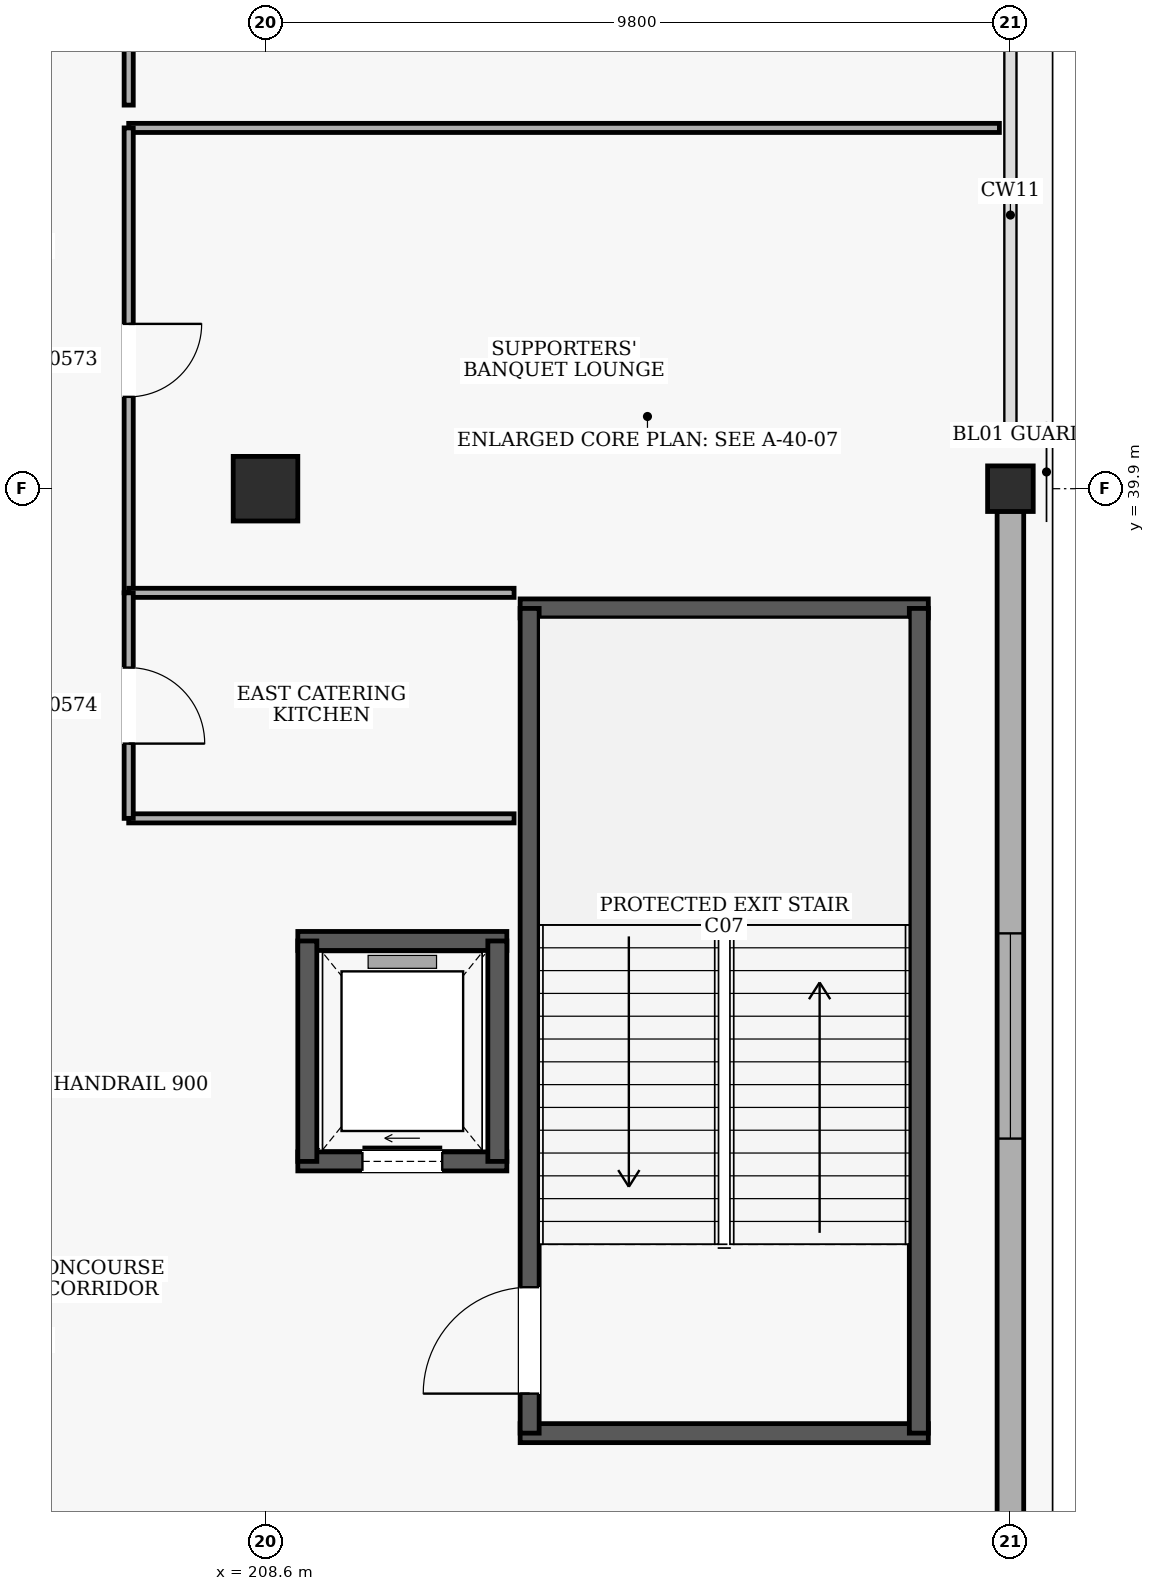
"""IFC4 building model, lengths in metres.
Left out: names, types, materials, properties, quantities, classifications, styles, units other than length and angle.
Written with IfcOpenShell. Run it as: python <this file> out.ifc"""

import sys

from ifc_helpers import new_model, si_unit, direction, frame, frame_2d, origin, origin_2d, place, context, subcontext, project, spatial, rectangle, extrude, element, fill, save


model = new_model("IFC4")
c1 = context("Model", 3, precision=1e-05, world=origin(), true_north=direction((0.0, 1.0)))
c2 = subcontext(c1, "Body", "Model", "MODEL_VIEW")
j1 = project(units=[si_unit("LENGTHUNIT", "METRE"), si_unit("PLANEANGLEUNIT", "RADIAN")], contexts=[c1])
p1 = place(None, origin())
s1 = spatial("IfcSite", under=j1, at=p1, CompositionType="ELEMENT")
p2 = place(p1, origin())
s2 = spatial("IfcBuilding", under=s1, at=p2, CompositionType="ELEMENT")
p3 = place(p2, frame((0.0, 0.0, 10.2)))
s3 = spatial("IfcBuildingStorey", under=s2, at=p3, CompositionType="ELEMENT", Elevation=10.2)
p4 = place(p3, frame((208.6, 39.9, 0.0), z_axis=(0.0, 0.0, 1.0), x_axis=(1.0, 0.0, 0.0)))
e1 = element("IfcColumn", 1, at=p4, inside=s3, PredefinedType="COLUMN", context=c2, shape_type="SweptSolid", body=[
    extrude(rectangle(XDim=0.85, YDim=0.85, at=origin_2d()), origin(), (0.0, 0.0, 1.0), 4.8),
])
p5 = place(p3, frame((218.4, 39.9, 0.0), z_axis=(0.0, 0.0, 1.0), x_axis=(1.0, 0.0, 0.0)))
e2 = element("IfcColumn", 2, at=p5, inside=s3, PredefinedType="COLUMN", context=c2, shape_type="SweptSolid", body=[
    extrude(rectangle(XDim=0.6, YDim=0.6, at=origin_2d()), origin(), (0.0, 0.0, 1.0), 4.8),
])
p6 = place(p3, frame((218.4, 39.605, 0.0), z_axis=(0.0, 0.0, 1.0), x_axis=(0.0, -1.0, 0.0)))
e3 = element("IfcWall", 3, at=p6, inside=s3, PredefinedType="SOLIDWALL", context=c2, shape_type="SweptSolid", body=[
    extrude(rectangle(XDim=13.81, YDim=0.35, at=frame_2d((6.905, 0.0))), origin(), (0.0, 0.0, 1.0), 3.56),
])
p7 = place(p6, frame((5.555, 0.0, 0.9)))
e4 = element("IfcOpeningElement", 4, at=p7, cuts=e3, PredefinedType="OPENING", context=c2, shape_type="SweptSolid", body=[
    extrude(rectangle(XDim=2.7, YDim=1.8, at=frame_2d((1.35, 0.9))), frame((0.0, 0.185, 0.0), z_axis=(0.0, -1.0, 0.0), x_axis=(1.0, 0.0, 0.0)), (0.0, 0.0, 1.0), 0.37),
])
for number, where, z_axis, x_axis in (
    (5, (211.95, 27.475, 0.0), (0.0, 0.0, 1.0), (1.0, 0.0, 0.0)),
    (6, (217.32, 38.325, 0.0), (0.0, 0.0, 1.0), (-1.0, 0.0, 0.0)),
):
    element("IfcWall", number, at=place(p3, frame(where, z_axis=z_axis, x_axis=x_axis)), inside=s3, PredefinedType="SHEAR", context=c2, shape_type="SweptSolid", body=[
        extrude(rectangle(XDim=5.37, YDim=0.25, at=frame_2d((2.685, 0.0))), origin(), (0.0, 0.0, 1.0), 4.48),
    ])
p8 = place(p3, frame((212.075, 27.475, 0.0), z_axis=(0.0, 0.0, 1.0), x_axis=(0.0, 1.0, 0.0)))
e7 = element("IfcWall", 7, at=p8, inside=s3, PredefinedType="SHEAR", context=c2, shape_type="SweptSolid", body=[
    extrude(rectangle(XDim=10.85, YDim=0.25, at=frame_2d((5.425, 0.0))), origin(), (0.0, 0.0, 1.0), 4.48),
])
p9 = place(p8, frame((0.52, 0.0, 0.0)))
e8 = element("IfcOpeningElement", 8, at=p9, cuts=e7, PredefinedType="OPENING", context=c2, shape_type="SweptSolid", body=[
    extrude(rectangle(XDim=1.4, YDim=2.15, at=frame_2d((0.7, 1.075))), frame((0.0, 0.135, 0.0), z_axis=(0.0, -1.0, 0.0), x_axis=(1.0, 0.0, 0.0)), (0.0, 0.0, 1.0), 0.27),
])
p10 = place(p3, frame((217.195, 27.475, 0.0), z_axis=(0.0, 0.0, 1.0), x_axis=(0.0, 1.0, 0.0)))
e9 = element("IfcWall", 9, at=p10, inside=s3, PredefinedType="SHEAR", context=c2, shape_type="SweptSolid", body=[
    extrude(rectangle(XDim=10.85, YDim=0.25, at=frame_2d((5.425, 0.0))), origin(), (0.0, 0.0, 1.0), 4.48),
])
p11 = place(p3, frame((209.025, 31.05, 0.0), z_axis=(0.0, 0.0, 1.0), x_axis=(1.0, 0.0, 0.0)))
e10 = element("IfcWall", 10, at=p11, inside=s3, PredefinedType="SHEAR", context=c2, shape_type="SweptSolid", body=[
    extrude(rectangle(XDim=2.75, YDim=0.25, at=frame_2d((1.375, 0.0))), origin(), (0.0, 0.0, 1.0), 4.48),
])
p12 = place(p11, frame((0.85, 0.0, 0.0)))
e11 = element("IfcOpeningElement", 11, at=p12, cuts=e10, PredefinedType="OPENING", context=c2, shape_type="SweptSolid", body=[
    extrude(rectangle(XDim=1.05, YDim=2.15, at=frame_2d((0.525, 1.075))), frame((0.0, 0.135, 0.0), z_axis=(0.0, -1.0, 0.0), x_axis=(1.0, 0.0, 0.0)), (0.0, 0.0, 1.0), 0.27),
])
p13 = place(p3, frame((211.775, 33.95, 0.0), z_axis=(0.0, 0.0, 1.0), x_axis=(-1.0, 0.0, 0.0)))
e12 = element("IfcWall", 12, at=p13, inside=s3, PredefinedType="SHEAR", context=c2, shape_type="SweptSolid", body=[
    extrude(rectangle(XDim=2.75, YDim=0.25, at=frame_2d((1.375, 0.0))), origin(), (0.0, 0.0, 1.0), 4.48),
])
for number, where, z_axis, x_axis in (
    (13, (209.15, 33.95, 0.0), (0.0, 0.0, 1.0), (0.0, -1.0, 0.0)),
    (14, (211.65, 31.05, 0.0), (0.0, 0.0, 1.0), (0.0, 1.0, 0.0)),
):
    element("IfcWall", number, at=place(p3, frame(where, z_axis=z_axis, x_axis=x_axis)), inside=s3, PredefinedType="SHEAR", context=c2, shape_type="SweptSolid", body=[
        extrude(rectangle(XDim=2.9, YDim=0.25, at=frame_2d((1.45, 0.0))), origin(), (0.0, 0.0, 1.0), 4.48),
    ])
p14 = place(p3, frame((218.255, 44.646, 0.0), z_axis=(0.0, 0.0, 1.0), x_axis=(-1.0, 0.0, 0.0)))
e15 = element("IfcWall", 15, at=p14, inside=s3, PredefinedType="PARTITIONING", context=c2, shape_type="SweptSolid", body=[
    extrude(rectangle(XDim=11.455, YDim=0.12, at=frame_2d((5.728, 0.0))), origin(), (0.0, 0.0, 1.0), 4.48),
])
p15 = place(p3, frame((206.8, 44.646, 0.0), z_axis=(0.0, 0.0, 1.0), x_axis=(0.0, -1.0, 0.0)))
e16 = element("IfcWall", 16, at=p15, inside=s3, PredefinedType="PARTITIONING", context=c2, shape_type="SweptSolid", body=[
    extrude(rectangle(XDim=6.116, YDim=0.12, at=frame_2d((3.058, 0.0))), origin(), (0.0, 0.0, 1.0), 4.48),
])
p16 = place(p15, frame((2.578, 0.0, 0.0)))
e17 = element("IfcOpeningElement", 17, at=p16, cuts=e16, PredefinedType="OPENING", context=c2, shape_type="SweptSolid", body=[
    extrude(rectangle(XDim=0.96, YDim=2.1, at=frame_2d((0.48, 1.05))), frame((0.0, 0.07, 0.0), z_axis=(0.0, -1.0, 0.0), x_axis=(1.0, 0.0, 0.0)), (0.0, 0.0, 1.0), 0.14),
])
for number, where, z_axis, x_axis in (
    (18, (206.8, 35.563, 0.0), (0.0, 0.0, 1.0), (1.0, 0.0, 0.0)),
    (19, (211.87, 38.53, 0.0), (0.0, 0.0, 1.0), (-1.0, 0.0, 0.0)),
):
    element("IfcWall", number, at=place(p3, frame(where, z_axis=z_axis, x_axis=x_axis)), inside=s3, PredefinedType="PARTITIONING", context=c2, shape_type="SweptSolid", body=[
        extrude(rectangle(XDim=5.07, YDim=0.12, at=frame_2d((2.535, 0.0))), origin(), (0.0, 0.0, 1.0), 4.48),
    ])
p17 = place(p3, frame((206.8, 38.53, 0.0), z_axis=(0.0, 0.0, 1.0), x_axis=(0.0, -1.0, 0.0)))
e20 = element("IfcWall", 20, at=p17, inside=s3, PredefinedType="PARTITIONING", context=c2, shape_type="SweptSolid", body=[
    extrude(rectangle(XDim=2.967, YDim=0.12, at=frame_2d((1.483, 0.0))), origin(), (0.0, 0.0, 1.0), 4.48),
])
p18 = place(p17, frame((0.984, 0.0, 0.0)))
e21 = element("IfcOpeningElement", 21, at=p18, cuts=e20, PredefinedType="OPENING", context=c2, shape_type="SweptSolid", body=[
    extrude(rectangle(XDim=1.0, YDim=2.1, at=frame_2d((0.5, 1.05))), frame((0.0, 0.07, 0.0), z_axis=(0.0, -1.0, 0.0), x_axis=(1.0, 0.0, 0.0)), (0.0, 0.0, 1.0), 0.14),
])
p19 = place(p3, frame((206.8, 54.03, 0.0), z_axis=(0.0, 0.0, 1.0), x_axis=(0.0, -1.0, 0.0)))
e22 = element("IfcWall", 22, at=p19, inside=s3, PredefinedType="PARTITIONING", context=c2, shape_type="SweptSolid", body=[
    extrude(rectangle(XDim=9.083, YDim=0.12, at=frame_2d((4.542, 0.0))), origin(), (0.0, 0.0, 1.0), 4.48),
])
p20 = place(p19, frame((4.017, 0.0, 0.0)))
e23 = element("IfcOpeningElement", 23, at=p20, cuts=e22, PredefinedType="OPENING", context=c2, shape_type="SweptSolid", body=[
    extrude(rectangle(XDim=1.05, YDim=2.15, at=frame_2d((0.525, 1.075))), frame((0.0, 0.07, 0.0), z_axis=(0.0, -1.0, 0.0), x_axis=(1.0, 0.0, 0.0)), (0.0, 0.0, 1.0), 0.14),
])
p21 = place(p7, origin())
e24 = element("IfcWindow", 24, at=p21, inside=s3, PartitioningType="SINGLE_PANEL", PredefinedType="WINDOW", context=c2, shape_type="SweptSolid", body=[
    extrude(rectangle(XDim=2.7, YDim=1.8, at=frame_2d((1.35, 0.9))), frame((0.0, 0.03, 0.0), z_axis=(0.0, -1.0, 0.0), x_axis=(1.0, 0.0, 0.0)), (0.0, 0.0, 1.0), 0.06),
])
fill(e4, e24)
p22 = place(p9, frame((1.4, 0.0, 0.0), z_axis=(0.0, 0.0, 1.0), x_axis=(-1.0, 0.0, 0.0)))
e25 = element("IfcDoor", 25, at=p22, inside=s3, OperationType="SINGLE_SWING_RIGHT", PredefinedType="DOOR", context=c2, shape_type="SweptSolid", body=[
    extrude(rectangle(XDim=1.4, YDim=2.15, at=frame_2d((0.7, 1.075))), frame((0.0, 0.025, 0.0), z_axis=(0.0, -1.0, 0.0), x_axis=(1.0, 0.0, 0.0)), (0.0, 0.0, 1.0), 0.05),
])
fill(e8, e25)
p23 = place(p12, origin())
e26 = element("IfcDoor", 26, at=p23, inside=s3, OperationType="SLIDING_TO_RIGHT", PredefinedType="DOOR", context=c2, shape_type="SweptSolid", body=[
    extrude(rectangle(XDim=1.05, YDim=2.15, at=frame_2d((0.525, 1.075))), frame((0.0, 0.025, 0.0), z_axis=(0.0, -1.0, 0.0), x_axis=(1.0, 0.0, 0.0)), (0.0, 0.0, 1.0), 0.05),
])
fill(e11, e26)
p24 = place(p16, origin())
e27 = element("IfcDoor", 27, at=p24, inside=s3, OperationType="SINGLE_SWING_LEFT", PredefinedType="DOOR", context=c2, shape_type="SweptSolid", body=[
    extrude(rectangle(XDim=0.96, YDim=2.1, at=frame_2d((0.48, 1.05))), frame((0.0, 0.025, 0.0), z_axis=(0.0, -1.0, 0.0), x_axis=(1.0, 0.0, 0.0)), (0.0, 0.0, 1.0), 0.05),
])
fill(e17, e27)
p25 = place(p18, origin())
e28 = element("IfcDoor", 28, at=p25, inside=s3, OperationType="SINGLE_SWING_RIGHT", PredefinedType="DOOR", context=c2, shape_type="SweptSolid", body=[
    extrude(rectangle(XDim=1.0, YDim=2.1, at=frame_2d((0.5, 1.05))), frame((0.0, 0.025, 0.0), z_axis=(0.0, -1.0, 0.0), x_axis=(1.0, 0.0, 0.0)), (0.0, 0.0, 1.0), 0.05),
])
fill(e21, e28)
save(model, sys.argv[1])
